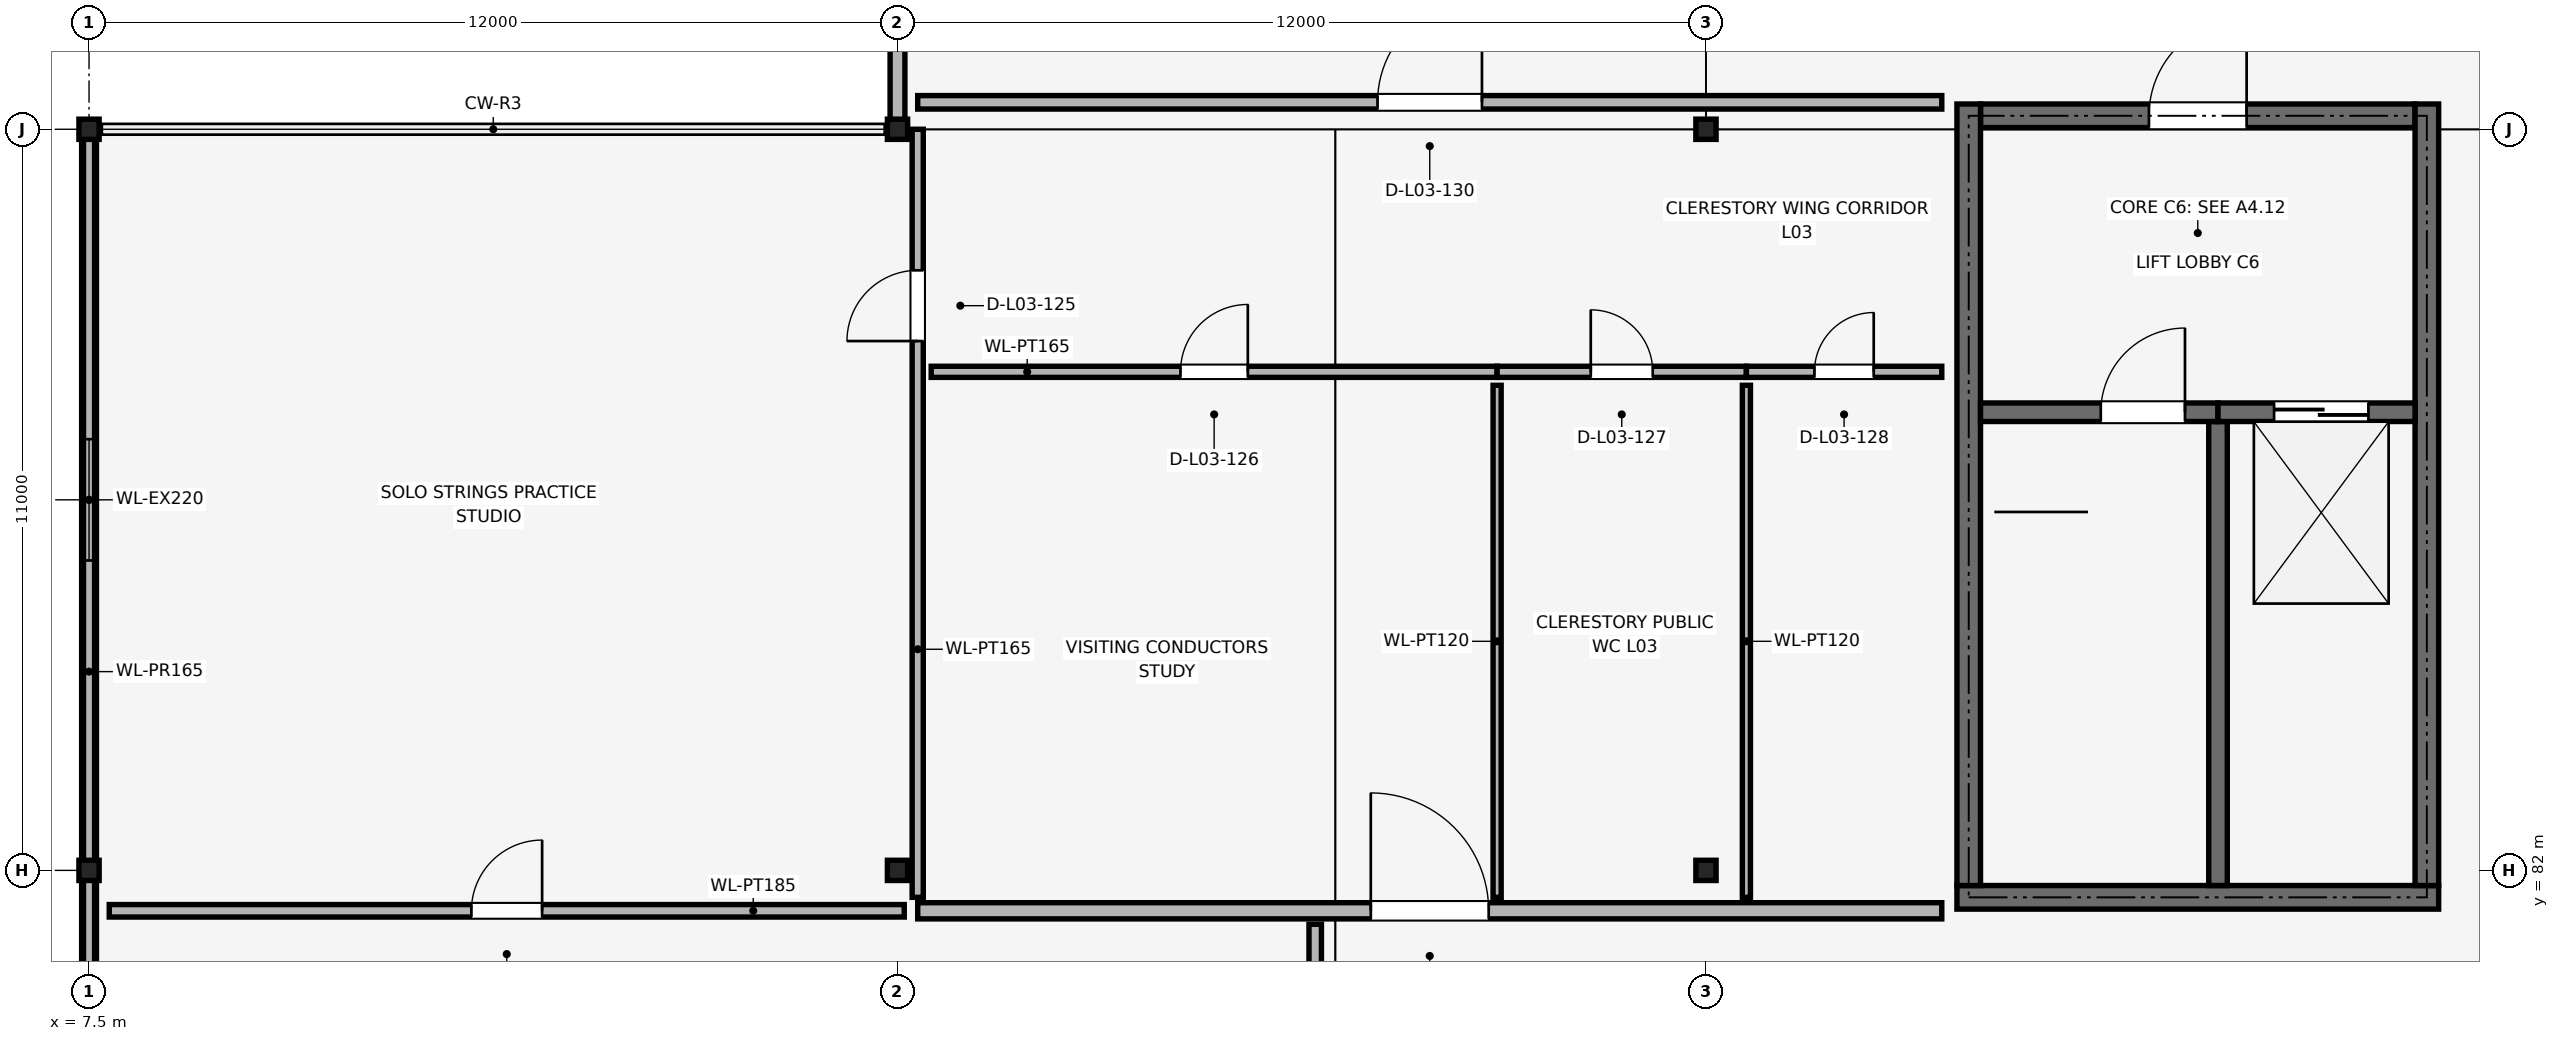
"""IFC4 building model, lengths in metres.
Left out: names, types, materials, properties, quantities, classifications, styles, units other than length and angle.
Written with IfcOpenShell. Run it as: python <this file> out.ifc"""

import sys

from ifc_helpers import new_model, si_unit, direction, frame, frame_2d, origin, origin_2d, place, context, subcontext, project, spatial, rectangle, i_section, extrude, element, fill, save


model = new_model("IFC4")
c1 = context("Model", 3, precision=1e-05, world=origin(), true_north=direction((0.0, 1.0)))
c2 = subcontext(c1, "Body", "Model", "MODEL_VIEW")
j1 = project(units=[si_unit("LENGTHUNIT", "METRE"), si_unit("PLANEANGLEUNIT", "RADIAN")], contexts=[c1])
p1 = place(None, origin())
s1 = spatial("IfcSite", under=j1, at=p1, CompositionType="ELEMENT")
p2 = place(p1, origin())
s2 = spatial("IfcBuilding", under=s1, at=p2, CompositionType="ELEMENT")
p3 = place(p2, frame((0.0, 0.0, 14.4)))
s3 = spatial("IfcBuildingStorey", under=s2, at=p3, CompositionType="ELEMENT", Elevation=14.4)
for number, where, z_axis, x_axis in (
    (1, (7.5, 82.0, 0.0), (0.0, 0.0, 1.0), (1.0, 0.0, 0.0)),
    (2, (7.5, 93.0, 0.0), (0.0, 0.0, 1.0), (1.0, 0.0, 0.0)),
    (3, (19.5, 82.0, 0.0), (0.0, 0.0, 1.0), (1.0, 0.0, 0.0)),
    (4, (19.5, 93.0, 0.0), (0.0, 0.0, 1.0), (1.0, 0.0, 0.0)),
    (5, (31.5, 82.0, 0.0), (0.0, 0.0, 1.0), (1.0, 0.0, 0.0)),
    (6, (31.5, 93.0, 0.0), (0.0, 0.0, 1.0), (1.0, 0.0, 0.0)),
):
    element("IfcColumn", number, at=place(p3, frame(where, z_axis=z_axis, x_axis=x_axis)), inside=s3, PredefinedType="COLUMN", context=c2, shape_type="SweptSolid", body=[
        extrude(i_section(OverallWidth=0.3, OverallDepth=0.3, WebThickness=0.011, FlangeThickness=0.019, FilletRadius=0.027, at=origin_2d()), origin(), (0.0, 0.0, 1.0), 4.2),
    ])
p4 = place(p3, frame((19.5, 93.02, 0.0), z_axis=(0.0, 0.0, 1.0), x_axis=(0.0, 1.0, 0.0)))
e7 = element("IfcWall", 7, at=p4, inside=s3, PredefinedType="SOLIDWALL", context=c2, shape_type="SweptSolid", body=[
    extrude(rectangle(XDim=10.96, YDim=0.22, at=frame_2d((5.48, 0.0))), origin(), (0.0, 0.0, 1.0), 3.35),
])
p5 = place(p4, frame((4.28, 0.0, 1.05)))
e8 = element("IfcOpeningElement", 8, at=p5, cuts=e7, PredefinedType="OPENING", context=c2, shape_type="SweptSolid", body=[
    extrude(rectangle(XDim=2.4, YDim=1.35, at=frame_2d((1.2, 0.675))), frame((0.0, 0.12, 0.0), z_axis=(0.0, -1.0, 0.0), x_axis=(1.0, 0.0, 0.0)), (0.0, 0.0, 1.0), 0.24),
])
p6 = place(p3, frame((7.5, 82.02, 0.0), z_axis=(0.0, 0.0, 1.0), x_axis=(0.0, 1.0, 0.0)))
e9 = element("IfcWall", 9, at=p6, inside=s3, PredefinedType="SOLIDWALL", context=c2, shape_type="SweptSolid", body=[
    extrude(rectangle(XDim=10.96, YDim=0.22, at=frame_2d((5.48, 0.0))), origin(), (0.0, 0.0, 1.0), 3.35),
])
p7 = place(p6, frame((4.58, 0.0, 1.5)))
e10 = element("IfcOpeningElement", 10, at=p7, cuts=e9, PredefinedType="OPENING", context=c2, shape_type="SweptSolid", body=[
    extrude(rectangle(XDim=1.8, YDim=1.05, at=frame_2d((0.9, 0.525))), frame((0.0, 0.12, 0.0), z_axis=(0.0, -1.0, 0.0), x_axis=(1.0, 0.0, 0.0)), (0.0, 0.0, 1.0), 0.24),
])
p8 = place(p3, frame((7.5, 71.02, 0.0), z_axis=(0.0, 0.0, 1.0), x_axis=(0.0, 1.0, 0.0)))
e11 = element("IfcWall", 11, at=p8, inside=s3, PredefinedType="SOLIDWALL", context=c2, shape_type="SweptSolid", body=[
    extrude(rectangle(XDim=10.96, YDim=0.22, at=frame_2d((5.48, 0.0))), origin(), (0.0, 0.0, 1.0), 3.35),
])
p9 = place(p8, frame((4.53, 0.0, 1.6)))
e12 = element("IfcOpeningElement", 12, at=p9, cuts=e11, PredefinedType="OPENING", context=c2, shape_type="SweptSolid", body=[
    extrude(rectangle(XDim=1.9, YDim=0.95, at=frame_2d((0.95, 0.475))), frame((0.0, 0.12, 0.0), z_axis=(0.0, -1.0, 0.0), x_axis=(1.0, 0.0, 0.0)), (0.0, 0.0, 1.0), 0.24),
])
p10 = place(p3, frame((7.5, 60.1, 4.2), z_axis=(0.0, 0.0, 1.0), x_axis=(0.0, 1.0, 0.0)))
e13 = element("IfcWall", 13, at=p10, inside=s3, PredefinedType="PARAPET", context=c2, shape_type="SweptSolid", body=[
    extrude(rectangle(XDim=32.8, YDim=0.165, at=frame_2d((16.4, 0.0))), origin(), (0.0, 0.0, 1.0), 0.65),
])
p11 = place(p3, frame((35.225, 81.6, 0.0), z_axis=(0.0, 0.0, 1.0), x_axis=(1.0, 0.0, 0.0)))
e14 = element("IfcWall", 14, at=p11, inside=s3, PredefinedType="SHEAR", context=c2, shape_type="SweptSolid", body=[
    extrude(rectangle(XDim=7.15, YDim=0.35, at=frame_2d((3.575, 0.0))), origin(), (0.0, 0.0, 1.0), 3.96),
])
p12 = place(p3, frame((35.575, 93.2, 0.0), z_axis=(0.0, 0.0, 1.0), x_axis=(1.0, 0.0, 0.0)))
e15 = element("IfcWall", 15, at=p12, inside=s3, PredefinedType="SHEAR", context=c2, shape_type="SweptSolid", body=[
    extrude(rectangle(XDim=6.45, YDim=0.35, at=frame_2d((3.225, 0.0))), origin(), (0.0, 0.0, 1.0), 3.96),
])
p13 = place(p12, frame((2.5, 0.0, 0.0)))
e16 = element("IfcOpeningElement", 16, at=p13, cuts=e15, PredefinedType="OPENING", context=c2, shape_type="SweptSolid", body=[
    extrude(rectangle(XDim=1.45, YDim=2.2, at=frame_2d((0.725, 1.1))), frame((0.0, 0.185, 0.0), z_axis=(0.0, -1.0, 0.0), x_axis=(1.0, 0.0, 0.0)), (0.0, 0.0, 1.0), 0.37),
])
for number, where, z_axis, x_axis in (
    (17, (35.4, 81.775, 0.0), (0.0, 0.0, 1.0), (0.0, 1.0, 0.0)),
    (18, (42.2, 81.775, 0.0), (0.0, 0.0, 1.0), (0.0, 1.0, 0.0)),
):
    element("IfcWall", number, at=place(p3, frame(where, z_axis=z_axis, x_axis=x_axis)), inside=s3, PredefinedType="SHEAR", context=c2, shape_type="SweptSolid", body=[
        extrude(rectangle(XDim=11.6, YDim=0.35, at=frame_2d((5.8, 0.0))), origin(), (0.0, 0.0, 1.0), 3.96),
    ])
p14 = place(p3, frame((39.1, 81.775, 0.0), z_axis=(0.0, 0.0, 1.0), x_axis=(0.0, 1.0, 0.0)))
e19 = element("IfcWall", 19, at=p14, inside=s3, PredefinedType="SHEAR", context=c2, shape_type="SweptSolid", body=[
    extrude(rectangle(XDim=6.888, YDim=0.275, at=frame_2d((3.444, 0.0))), origin(), (0.0, 0.0, 1.0), 3.96),
])
p15 = place(p3, frame((35.575, 88.8, 0.0), z_axis=(0.0, 0.0, 1.0), x_axis=(1.0, 0.0, 0.0)))
e20 = element("IfcWall", 20, at=p15, inside=s3, PredefinedType="SHEAR", context=c2, shape_type="SweptSolid", body=[
    extrude(rectangle(XDim=3.525, YDim=0.275, at=frame_2d((1.763, 0.0))), origin(), (0.0, 0.0, 1.0), 3.96),
])
p16 = place(p15, frame((1.785, 0.0, 0.0)))
e21 = element("IfcOpeningElement", 21, at=p16, cuts=e20, PredefinedType="OPENING", context=c2, shape_type="SweptSolid", body=[
    extrude(rectangle(XDim=1.25, YDim=2.15, at=frame_2d((0.625, 1.075))), frame((0.0, 0.147, 0.0), z_axis=(0.0, -1.0, 0.0), x_axis=(1.0, 0.0, 0.0)), (0.0, 0.0, 1.0), 0.295),
])
p17 = place(p3, frame((39.1, 88.8, 0.0), z_axis=(0.0, 0.0, 1.0), x_axis=(1.0, 0.0, 0.0)))
e22 = element("IfcWall", 22, at=p17, inside=s3, PredefinedType="SHEAR", context=c2, shape_type="SweptSolid", body=[
    extrude(rectangle(XDim=2.925, YDim=0.275, at=frame_2d((1.462, 0.0))), origin(), (0.0, 0.0, 1.0), 3.96),
])
p18 = place(p17, frame((0.833, 0.0, 0.0)))
e23 = element("IfcOpeningElement", 23, at=p18, cuts=e22, PredefinedType="OPENING", context=c2, shape_type="SweptSolid", body=[
    extrude(rectangle(XDim=1.4, YDim=2.2, at=frame_2d((0.7, 1.1))), frame((0.0, 0.147, 0.0), z_axis=(0.0, -1.0, 0.0), x_axis=(1.0, 0.0, 0.0)), (0.0, 0.0, 1.0), 0.295),
])
p19 = place(p3, frame((19.8, 81.4, 0.0), z_axis=(0.0, 0.0, 1.0), x_axis=(1.0, 0.0, 0.0)))
e24 = element("IfcWall", 24, at=p19, inside=s3, PredefinedType="PARTITIONING", context=c2, shape_type="SweptSolid", body=[
    extrude(rectangle(XDim=15.2, YDim=0.24, at=frame_2d((7.6, 0.0))), origin(), (0.0, 0.0, 1.0), 3.39),
])
p20 = place(p19, frame((6.725, 0.0, 0.0)))
e25 = element("IfcOpeningElement", 25, at=p20, cuts=e24, PredefinedType="OPENING", context=c2, shape_type="SweptSolid", body=[
    extrude(rectangle(XDim=1.75, YDim=2.25, at=frame_2d((0.875, 1.125))), frame((0.0, 0.13, 0.0), z_axis=(0.0, -1.0, 0.0), x_axis=(1.0, 0.0, 0.0)), (0.0, 0.0, 1.0), 0.26),
])
p21 = place(p3, frame((7.8, 81.4, 0.0), z_axis=(0.0, 0.0, 1.0), x_axis=(1.0, 0.0, 0.0)))
e26 = element("IfcWall", 26, at=p21, inside=s3, PredefinedType="PARTITIONING", context=c2, shape_type="SweptSolid", body=[
    extrude(rectangle(XDim=11.8, YDim=0.185, at=frame_2d((5.9, 0.0))), origin(), (0.0, 0.0, 1.0), 3.39),
])
p22 = place(p21, frame((5.375, 0.0, 0.0)))
e27 = element("IfcOpeningElement", 27, at=p22, cuts=e26, PredefinedType="OPENING", context=c2, shape_type="SweptSolid", body=[
    extrude(rectangle(XDim=1.05, YDim=2.15, at=frame_2d((0.525, 1.075))), frame((0.0, 0.103, 0.0), z_axis=(0.0, -1.0, 0.0), x_axis=(1.0, 0.0, 0.0)), (0.0, 0.0, 1.0), 0.205),
])
p23 = place(p3, frame((19.8, 81.6, 0.0), z_axis=(0.0, 0.0, 1.0), x_axis=(0.0, 1.0, 0.0)))
e28 = element("IfcWall", 28, at=p23, inside=s3, PredefinedType="PARTITIONING", context=c2, shape_type="SweptSolid", body=[
    extrude(rectangle(XDim=11.4, YDim=0.165, at=frame_2d((5.7, 0.0))), origin(), (0.0, 0.0, 1.0), 3.954),
])
p24 = place(p23, frame((8.257, 0.0, 0.0)))
e29 = element("IfcOpeningElement", 29, at=p24, cuts=e28, PredefinedType="OPENING", context=c2, shape_type="SweptSolid", body=[
    extrude(rectangle(XDim=1.05, YDim=2.15, at=frame_2d((0.525, 1.075))), frame((0.0, 0.093, 0.0), z_axis=(0.0, -1.0, 0.0), x_axis=(1.0, 0.0, 0.0)), (0.0, 0.0, 1.0), 0.185),
])
p25 = place(p3, frame((20.0, 89.4, 0.0), z_axis=(0.0, 0.0, 1.0), x_axis=(1.0, 0.0, 0.0)))
e30 = element("IfcWall", 30, at=p25, inside=s3, PredefinedType="PARTITIONING", context=c2, shape_type="SweptSolid", body=[
    extrude(rectangle(XDim=8.4, YDim=0.165, at=frame_2d((4.2, 0.0))), origin(), (0.0, 0.0, 1.0), 3.954),
])
p26 = place(p25, frame((3.7, 0.0, 0.0)))
e31 = element("IfcOpeningElement", 31, at=p26, cuts=e30, PredefinedType="OPENING", context=c2, shape_type="SweptSolid", body=[
    extrude(rectangle(XDim=1.0, YDim=2.12, at=frame_2d((0.5, 1.06))), frame((0.0, 0.093, 0.0), z_axis=(0.0, -1.0, 0.0), x_axis=(1.0, 0.0, 0.0)), (0.0, 0.0, 1.0), 0.185),
])
p27 = place(p3, frame((28.4, 89.4, 0.0), z_axis=(0.0, 0.0, 1.0), x_axis=(1.0, 0.0, 0.0)))
e32 = element("IfcWall", 32, at=p27, inside=s3, PredefinedType="PARTITIONING", context=c2, shape_type="SweptSolid", body=[
    extrude(rectangle(XDim=3.7, YDim=0.165, at=frame_2d((1.85, 0.0))), origin(), (0.0, 0.0, 1.0), 3.954),
])
p28 = place(p27, frame((1.39, 0.0, 0.0)))
e33 = element("IfcOpeningElement", 33, at=p28, cuts=e32, PredefinedType="OPENING", context=c2, shape_type="SweptSolid", body=[
    extrude(rectangle(XDim=0.92, YDim=2.1, at=frame_2d((0.46, 1.05))), frame((0.0, 0.093, 0.0), z_axis=(0.0, -1.0, 0.0), x_axis=(1.0, 0.0, 0.0)), (0.0, 0.0, 1.0), 0.185),
])
p29 = place(p3, frame((32.1, 89.4, 0.0), z_axis=(0.0, 0.0, 1.0), x_axis=(1.0, 0.0, 0.0)))
e34 = element("IfcWall", 34, at=p29, inside=s3, PredefinedType="PARTITIONING", context=c2, shape_type="SweptSolid", body=[
    extrude(rectangle(XDim=2.9, YDim=0.165, at=frame_2d((1.45, 0.0))), origin(), (0.0, 0.0, 1.0), 3.954),
])
p30 = place(p29, frame((1.01, 0.0, 0.0)))
e35 = element("IfcOpeningElement", 35, at=p30, cuts=e34, PredefinedType="OPENING", context=c2, shape_type="SweptSolid", body=[
    extrude(rectangle(XDim=0.88, YDim=2.1, at=frame_2d((0.44, 1.05))), frame((0.0, 0.093, 0.0), z_axis=(0.0, -1.0, 0.0), x_axis=(1.0, 0.0, 0.0)), (0.0, 0.0, 1.0), 0.185),
])
for number, where, z_axis, x_axis in (
    (36, (28.4, 81.6, 0.0), (0.0, 0.0, 1.0), (0.0, 1.0, 0.0)),
    (37, (32.1, 81.6, 0.0), (0.0, 0.0, 1.0), (0.0, 1.0, 0.0)),
):
    element("IfcWall", number, at=place(p3, frame(where, z_axis=z_axis, x_axis=x_axis)), inside=s3, PredefinedType="PARTITIONING", context=c2, shape_type="SweptSolid", body=[
        extrude(rectangle(XDim=7.6, YDim=0.12, at=frame_2d((3.8, 0.0))), origin(), (0.0, 0.0, 1.0), 3.954),
    ])
p31 = place(p3, frame((25.7, 60.3, 0.0), z_axis=(0.0, 0.0, 1.0), x_axis=(0.0, 1.0, 0.0)))
e38 = element("IfcWall", 38, at=p31, inside=s3, PredefinedType="PARTITIONING", context=c2, shape_type="SweptSolid", body=[
    extrude(rectangle(XDim=20.9, YDim=0.185, at=frame_2d((10.45, 0.0))), origin(), (0.0, 0.0, 1.0), 3.39),
])
p32 = place(p31, frame((9.9, 0.0, 0.0)))
e39 = element("IfcOpeningElement", 39, at=p32, cuts=e38, PredefinedType="OPENING", context=c2, shape_type="SweptSolid", body=[
    extrude(rectangle(XDim=1.1, YDim=2.15, at=frame_2d((0.55, 1.075))), frame((0.0, 0.103, 0.0), z_axis=(0.0, -1.0, 0.0), x_axis=(1.0, 0.0, 0.0)), (0.0, 0.0, 1.0), 0.205),
])
p33 = place(p3, frame((19.8, 93.4, 0.0), z_axis=(0.0, 0.0, 1.0), x_axis=(1.0, 0.0, 0.0)))
e40 = element("IfcWall", 40, at=p33, inside=s3, PredefinedType="PARTITIONING", context=c2, shape_type="SweptSolid", body=[
    extrude(rectangle(XDim=15.2, YDim=0.2, at=frame_2d((7.6, 0.0))), origin(), (0.0, 0.0, 1.0), 3.39),
])
p34 = place(p33, frame((6.825, 0.0, 0.0)))
e41 = element("IfcOpeningElement", 41, at=p34, cuts=e40, PredefinedType="OPENING", context=c2, shape_type="SweptSolid", body=[
    extrude(rectangle(XDim=1.55, YDim=2.18, at=frame_2d((0.775, 1.09))), frame((0.0, 0.11, 0.0), z_axis=(0.0, -1.0, 0.0), x_axis=(1.0, 0.0, 0.0)), (0.0, 0.0, 1.0), 0.22),
])
p35 = place(p7, origin())
e42 = element("IfcWindow", 42, at=p35, inside=s3, PartitioningType="SINGLE_PANEL", PredefinedType="WINDOW", context=c2, shape_type="SweptSolid", body=[
    extrude(rectangle(XDim=1.8, YDim=1.05, at=frame_2d((0.9, 0.525))), frame((0.0, 0.03, 0.0), z_axis=(0.0, -1.0, 0.0), x_axis=(1.0, 0.0, 0.0)), (0.0, 0.0, 1.0), 0.06),
])
fill(e10, e42)
p36 = place(p16, origin())
e43 = element("IfcDoor", 43, at=p36, inside=s3, OperationType="SINGLE_SWING_RIGHT", PredefinedType="DOOR", context=c2, shape_type="SweptSolid", body=[
    extrude(rectangle(XDim=1.25, YDim=2.15, at=frame_2d((0.625, 1.075))), frame((0.0, 0.025, 0.0), z_axis=(0.0, -1.0, 0.0), x_axis=(1.0, 0.0, 0.0)), (0.0, 0.0, 1.0), 0.05),
])
fill(e21, e43)
p37 = place(p18, origin())
e44 = element("IfcDoor", 44, at=p37, inside=s3, OperationType="DOUBLE_DOOR_SLIDING", PredefinedType="DOOR", context=c2, shape_type="SweptSolid", body=[
    extrude(rectangle(XDim=1.4, YDim=2.2, at=frame_2d((0.7, 1.1))), frame((0.0, 0.025, 0.0), z_axis=(0.0, -1.0, 0.0), x_axis=(1.0, 0.0, 0.0)), (0.0, 0.0, 1.0), 0.05),
])
fill(e23, e44)
p38 = place(p13, origin())
e45 = element("IfcDoor", 45, at=p38, inside=s3, OperationType="SINGLE_SWING_RIGHT", PredefinedType="DOOR", context=c2, shape_type="SweptSolid", body=[
    extrude(rectangle(XDim=1.45, YDim=2.2, at=frame_2d((0.725, 1.1))), frame((0.0, 0.025, 0.0), z_axis=(0.0, -1.0, 0.0), x_axis=(1.0, 0.0, 0.0)), (0.0, 0.0, 1.0), 0.05),
])
fill(e16, e45)
p39 = place(p20, origin())
e46 = element("IfcDoor", 46, at=p39, inside=s3, OperationType="SINGLE_SWING_LEFT", PredefinedType="DOOR", context=c2, shape_type="SweptSolid", body=[
    extrude(rectangle(XDim=1.75, YDim=2.25, at=frame_2d((0.875, 1.125))), frame((0.0, 0.025, 0.0), z_axis=(0.0, -1.0, 0.0), x_axis=(1.0, 0.0, 0.0)), (0.0, 0.0, 1.0), 0.05),
])
fill(e25, e46)
p40 = place(p22, origin())
e47 = element("IfcDoor", 47, at=p40, inside=s3, OperationType="SINGLE_SWING_RIGHT", PredefinedType="DOOR", context=c2, shape_type="SweptSolid", body=[
    extrude(rectangle(XDim=1.05, YDim=2.15, at=frame_2d((0.525, 1.075))), frame((0.0, 0.025, 0.0), z_axis=(0.0, -1.0, 0.0), x_axis=(1.0, 0.0, 0.0)), (0.0, 0.0, 1.0), 0.05),
])
fill(e27, e47)
p41 = place(p24, origin())
e48 = element("IfcDoor", 48, at=p41, inside=s3, OperationType="SINGLE_SWING_LEFT", PredefinedType="DOOR", context=c2, shape_type="SweptSolid", body=[
    extrude(rectangle(XDim=1.05, YDim=2.15, at=frame_2d((0.525, 1.075))), frame((0.0, 0.025, 0.0), z_axis=(0.0, -1.0, 0.0), x_axis=(1.0, 0.0, 0.0)), (0.0, 0.0, 1.0), 0.05),
])
fill(e29, e48)
p42 = place(p26, origin())
e49 = element("IfcDoor", 49, at=p42, inside=s3, OperationType="SINGLE_SWING_RIGHT", PredefinedType="DOOR", context=c2, shape_type="SweptSolid", body=[
    extrude(rectangle(XDim=1.0, YDim=2.12, at=frame_2d((0.5, 1.06))), frame((0.0, 0.025, 0.0), z_axis=(0.0, -1.0, 0.0), x_axis=(1.0, 0.0, 0.0)), (0.0, 0.0, 1.0), 0.05),
])
fill(e31, e49)
p43 = place(p28, origin())
e50 = element("IfcDoor", 50, at=p43, inside=s3, OperationType="SINGLE_SWING_LEFT", PredefinedType="DOOR", context=c2, shape_type="SweptSolid", body=[
    extrude(rectangle(XDim=0.92, YDim=2.1, at=frame_2d((0.46, 1.05))), frame((0.0, 0.025, 0.0), z_axis=(0.0, -1.0, 0.0), x_axis=(1.0, 0.0, 0.0)), (0.0, 0.0, 1.0), 0.05),
])
fill(e33, e50)
p44 = place(p30, origin())
e51 = element("IfcDoor", 51, at=p44, inside=s3, OperationType="SINGLE_SWING_RIGHT", PredefinedType="DOOR", context=c2, shape_type="SweptSolid", body=[
    extrude(rectangle(XDim=0.88, YDim=2.1, at=frame_2d((0.44, 1.05))), frame((0.0, 0.025, 0.0), z_axis=(0.0, -1.0, 0.0), x_axis=(1.0, 0.0, 0.0)), (0.0, 0.0, 1.0), 0.05),
])
fill(e35, e51)
p45 = place(p34, origin())
e52 = element("IfcDoor", 52, at=p45, inside=s3, OperationType="SINGLE_SWING_RIGHT", PredefinedType="DOOR", context=c2, shape_type="SweptSolid", body=[
    extrude(rectangle(XDim=1.55, YDim=2.18, at=frame_2d((0.775, 1.09))), frame((0.0, 0.025, 0.0), z_axis=(0.0, -1.0, 0.0), x_axis=(1.0, 0.0, 0.0)), (0.0, 0.0, 1.0), 0.05),
])
fill(e41, e52)
save(model, sys.argv[1])
